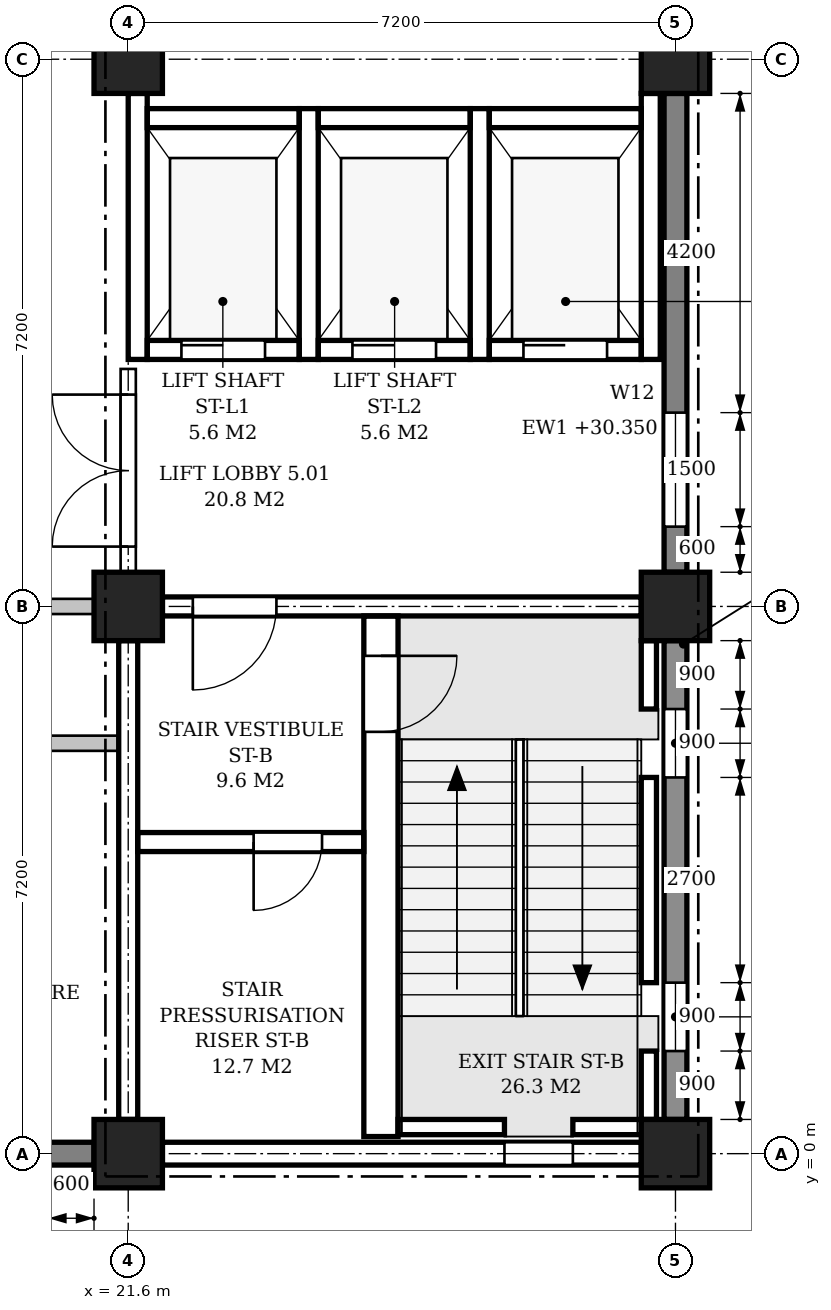
"""IFC4 building model, lengths in metres.
Left out: names, types, materials, properties, quantities, classifications, styles, units other than length and angle.
Written with IfcOpenShell. Run it as: python <this file> out.ifc"""

import sys

from ifc_helpers import new_model, si_unit, direction, frame, frame_2d, origin, origin_2d, place, context, subcontext, project, spatial, polyline, rectangle, outline, extrude, element, fill, save


model = new_model("IFC4")
c1 = context("Model", 3, precision=1e-05, world=origin(), true_north=direction((0.0, 1.0)))
c2 = subcontext(c1, "Body", "Model", "MODEL_VIEW")
j1 = project(units=[si_unit("LENGTHUNIT", "METRE"), si_unit("PLANEANGLEUNIT", "RADIAN")], contexts=[c1])
p1 = place(None, origin())
s1 = spatial("IfcSite", under=j1, at=p1, CompositionType="ELEMENT")
p2 = place(p1, origin())
s2 = spatial("IfcBuilding", under=s1, at=p2, CompositionType="ELEMENT")
p3 = place(p2, frame((0.0, 0.0, 26.4)))
s3 = spatial("IfcBuildingStorey", under=s2, at=p3, CompositionType="ELEMENT", Elevation=26.4)
for number, where, z_axis, x_axis in (
    (1, (21.6, 0.0, 0.0), (0.0, 0.0, 1.0), (1.0, 0.0, 0.0)),
    (2, (21.6, 7.2, 0.0), (0.0, 0.0, 1.0), (1.0, 0.0, 0.0)),
    (3, (21.6, 14.4, 0.0), (0.0, 0.0, 1.0), (1.0, 0.0, 0.0)),
    (4, (28.8, 0.0, 0.0), (0.0, 0.0, 1.0), (1.0, 0.0, 0.0)),
    (5, (28.8, 7.2, 0.0), (0.0, 0.0, 1.0), (1.0, 0.0, 0.0)),
    (6, (28.8, 14.4, 0.0), (0.0, 0.0, 1.0), (1.0, 0.0, 0.0)),
):
    element("IfcColumn", number, at=place(p3, frame(where, z_axis=z_axis, x_axis=x_axis)), inside=s3, PredefinedType="COLUMN", context=c2, shape_type="SweptSolid", body=[
        extrude(rectangle(XDim=0.9, YDim=0.9, at=origin_2d()), origin(), (0.0, 0.0, 1.0), 4.8),
    ])
p4 = place(p3, frame((14.85, 0.0, 0.0), z_axis=(0.0, 0.0, 1.0), x_axis=(1.0, 0.0, 0.0)))
e7 = element("IfcWall", 7, at=p4, inside=s3, PredefinedType="STANDARD", context=c2, shape_type="SweptSolid", body=[
    extrude(rectangle(XDim=6.3, YDim=0.3, at=frame_2d((3.15, 0.0))), origin(), (0.0, 0.0, 1.0), 3.95),
])
p5 = place(p4, frame((0.6, 0.0, 0.9)))
e8 = element("IfcOpeningElement", 8, at=p5, cuts=e7, PredefinedType="OPENING", context=c2, shape_type="SweptSolid", body=[
    extrude(outline(polyline([(0.0, 0.0), (1.5, 0.0), (1.5, 1.75), (0.75, 2.5), (0.0, 1.75), (0.0, 0.0)])), frame((0.0, 0.16, 0.0), z_axis=(0.0, -1.0, 0.0), x_axis=(1.0, 0.0, 0.0)), (0.0, 0.0, 1.0), 0.32),
])
p6 = place(p4, frame((4.2, 0.0, 0.9)))
e9 = element("IfcOpeningElement", 9, at=p6, cuts=e7, PredefinedType="OPENING", context=c2, shape_type="SweptSolid", body=[
    extrude(outline(polyline([(0.0, 0.0), (1.5, 0.0), (1.5, 1.75), (0.75, 2.5), (0.0, 1.75), (0.0, 0.0)])), frame((0.0, 0.16, 0.0), z_axis=(0.0, -1.0, 0.0), x_axis=(1.0, 0.0, 0.0)), (0.0, 0.0, 1.0), 0.32),
])
p7 = place(p3, frame((22.05, 0.0, 0.0), z_axis=(0.0, 0.0, 1.0), x_axis=(1.0, 0.0, 0.0)))
e10 = element("IfcWall", 10, at=p7, inside=s3, PredefinedType="STANDARD", context=c2, shape_type="SweptSolid", body=[
    extrude(rectangle(XDim=6.3, YDim=0.3, at=frame_2d((3.15, 0.0))), origin(), (0.0, 0.0, 1.0), 3.95),
])
p8 = place(p7, frame((4.5, 0.0, 0.9)))
e11 = element("IfcOpeningElement", 11, at=p8, cuts=e10, PredefinedType="OPENING", context=c2, shape_type="SweptSolid", body=[
    extrude(outline(polyline([(0.0, 0.0), (0.9, 0.0), (0.9, 2.05), (0.45, 2.5), (0.0, 2.05), (0.0, 0.0)])), frame((0.0, 0.16, 0.0), z_axis=(0.0, -1.0, 0.0), x_axis=(1.0, 0.0, 0.0)), (0.0, 0.0, 1.0), 0.32),
])
p9 = place(p3, frame((28.8, 0.45, 0.0), z_axis=(0.0, 0.0, 1.0), x_axis=(0.0, 1.0, 0.0)))
e12 = element("IfcWall", 12, at=p9, inside=s3, PredefinedType="STANDARD", context=c2, shape_type="SweptSolid", body=[
    extrude(rectangle(XDim=6.3, YDim=0.3, at=frame_2d((3.15, 0.0))), origin(), (0.0, 0.0, 1.0), 3.95),
])
p10 = place(p9, frame((0.9, 0.0, 0.9)))
e13 = element("IfcOpeningElement", 13, at=p10, cuts=e12, PredefinedType="OPENING", context=c2, shape_type="SweptSolid", body=[
    extrude(outline(polyline([(0.0, 0.0), (0.9, 0.0), (0.9, 2.05), (0.45, 2.5), (0.0, 2.05), (0.0, 0.0)])), frame((0.0, 0.16, 0.0), z_axis=(0.0, -1.0, 0.0), x_axis=(1.0, 0.0, 0.0)), (0.0, 0.0, 1.0), 0.32),
])
p11 = place(p9, frame((4.5, 0.0, 0.9)))
e14 = element("IfcOpeningElement", 14, at=p11, cuts=e12, PredefinedType="OPENING", context=c2, shape_type="SweptSolid", body=[
    extrude(outline(polyline([(0.0, 0.0), (0.9, 0.0), (0.9, 2.05), (0.45, 2.5), (0.0, 2.05), (0.0, 0.0)])), frame((0.0, 0.16, 0.0), z_axis=(0.0, -1.0, 0.0), x_axis=(1.0, 0.0, 0.0)), (0.0, 0.0, 1.0), 0.32),
])
p12 = place(p3, frame((28.8, 7.65, 0.0), z_axis=(0.0, 0.0, 1.0), x_axis=(0.0, 1.0, 0.0)))
e15 = element("IfcWall", 15, at=p12, inside=s3, PredefinedType="STANDARD", context=c2, shape_type="SweptSolid", body=[
    extrude(rectangle(XDim=6.3, YDim=0.3, at=frame_2d((3.15, 0.0))), origin(), (0.0, 0.0, 1.0), 3.95),
])
p13 = place(p12, frame((0.6, 0.0, 0.9)))
e16 = element("IfcOpeningElement", 16, at=p13, cuts=e15, PredefinedType="OPENING", context=c2, shape_type="SweptSolid", body=[
    extrude(outline(polyline([(0.0, 0.0), (1.5, 0.0), (1.5, 1.75), (0.75, 2.5), (0.0, 1.75), (0.0, 0.0)])), frame((0.0, 0.16, 0.0), z_axis=(0.0, -1.0, 0.0), x_axis=(1.0, 0.0, 0.0)), (0.0, 0.0, 1.0), 0.32),
])
p14 = place(p3, frame((22.05, 7.2, 0.0), z_axis=(0.0, 0.0, 1.0), x_axis=(1.0, 0.0, 0.0)))
e17 = element("IfcWall", 17, at=p14, inside=s3, PredefinedType="SHEAR", context=c2, shape_type="SweptSolid", body=[
    extrude(rectangle(XDim=6.3, YDim=0.25, at=frame_2d((3.15, 0.0))), origin(), (0.0, 0.0, 1.0), 3.8),
])
p15 = place(p14, frame((0.4, 0.0, 0.0)))
e18 = element("IfcOpeningElement", 18, at=p15, cuts=e17, PredefinedType="OPENING", context=c2, shape_type="SweptSolid", body=[
    extrude(rectangle(XDim=1.1, YDim=2.1, at=frame_2d((0.55, 1.05))), frame((0.0, 0.135, 0.0), z_axis=(0.0, -1.0, 0.0), x_axis=(1.0, 0.0, 0.0)), (0.0, 0.0, 1.0), 0.27),
])
p16 = place(p3, frame((21.6, 0.45, 0.0), z_axis=(0.0, 0.0, 1.0), x_axis=(0.0, 1.0, 0.0)))
e19 = element("IfcWall", 19, at=p16, inside=s3, PredefinedType="SHEAR", context=c2, shape_type="SweptSolid", body=[
    extrude(rectangle(XDim=6.3, YDim=0.25, at=frame_2d((3.15, 0.0))), origin(), (0.0, 0.0, 1.0), 3.8),
])
p17 = place(p3, frame((28.45, 0.45, -0.25), z_axis=(0.0, 0.0, 1.0), x_axis=(0.0, 1.0, 0.0)))
e20 = element("IfcWall", 20, at=p17, inside=s3, PredefinedType="SHEAR", context=c2, shape_type="SweptSolid", body=[
    extrude(rectangle(XDim=0.9, YDim=0.2, at=frame_2d((0.45, 0.0))), origin(), (0.0, 0.0, 1.0), 4.8),
])
p18 = place(p3, frame((28.45, 2.25, -0.25), z_axis=(0.0, 0.0, 1.0), x_axis=(0.0, 1.0, 0.0)))
e21 = element("IfcWall", 21, at=p18, inside=s3, PredefinedType="SHEAR", context=c2, shape_type="SweptSolid", body=[
    extrude(rectangle(XDim=2.7, YDim=0.2, at=frame_2d((1.35, 0.0))), origin(), (0.0, 0.0, 1.0), 4.8),
])
p19 = place(p3, frame((28.45, 5.85, -0.25), z_axis=(0.0, 0.0, 1.0), x_axis=(0.0, 1.0, 0.0)))
e22 = element("IfcWall", 22, at=p19, inside=s3, PredefinedType="SHEAR", context=c2, shape_type="SweptSolid", body=[
    extrude(rectangle(XDim=0.9, YDim=0.2, at=frame_2d((0.45, 0.0))), origin(), (0.0, 0.0, 1.0), 4.8),
])
p20 = place(p3, frame((25.15, 0.35, -0.25), z_axis=(0.0, 0.0, 1.0), x_axis=(1.0, 0.0, 0.0)))
e23 = element("IfcWall", 23, at=p20, inside=s3, PredefinedType="SHEAR", context=c2, shape_type="SweptSolid", body=[
    extrude(rectangle(XDim=1.4, YDim=0.2, at=frame_2d((0.7, 0.0))), origin(), (0.0, 0.0, 1.0), 4.8),
])
p21 = place(p3, frame((27.45, 0.35, -0.25), z_axis=(0.0, 0.0, 1.0), x_axis=(1.0, 0.0, 0.0)))
e24 = element("IfcWall", 24, at=p21, inside=s3, PredefinedType="SHEAR", context=c2, shape_type="SweptSolid", body=[
    extrude(rectangle(XDim=0.9, YDim=0.2, at=frame_2d((0.45, 0.0))), origin(), (0.0, 0.0, 1.0), 4.8),
])
p22 = place(p3, frame((24.925, 0.225, 0.0), z_axis=(0.0, 0.0, 1.0), x_axis=(0.0, 1.0, 0.0)))
e25 = element("IfcWall", 25, at=p22, inside=s3, PredefinedType="SHEAR", context=c2, shape_type="SweptSolid", body=[
    extrude(rectangle(XDim=6.85, YDim=0.45, at=frame_2d((3.425, 0.0))), origin(), (0.0, 0.0, 1.0), 4.55),
])
p23 = place(p22, frame((5.325, 0.0, 0.0)))
e26 = element("IfcOpeningElement", 26, at=p23, cuts=e25, PredefinedType="OPENING", context=c2, shape_type="SweptSolid", body=[
    extrude(rectangle(XDim=1.0, YDim=2.1, at=frame_2d((0.5, 1.05))), frame((0.0, 0.235, 0.0), z_axis=(0.0, -1.0, 0.0), x_axis=(1.0, 0.0, 0.0)), (0.0, 0.0, 1.0), 0.47),
])
p24 = place(p3, frame((21.725, 4.1, 0.0), z_axis=(0.0, 0.0, 1.0), x_axis=(1.0, 0.0, 0.0)))
e27 = element("IfcWall", 27, at=p24, inside=s3, PredefinedType="SHEAR", context=c2, shape_type="SweptSolid", body=[
    extrude(rectangle(XDim=2.975, YDim=0.25, at=frame_2d((1.487, 0.0))), origin(), (0.0, 0.0, 1.0), 4.55),
])
p25 = place(p24, frame((1.525, 0.0, 0.0)))
e28 = element("IfcOpeningElement", 28, at=p25, cuts=e27, PredefinedType="OPENING", context=c2, shape_type="SweptSolid", body=[
    extrude(rectangle(XDim=0.9, YDim=2.1, at=frame_2d((0.45, 1.05))), frame((0.0, 0.135, 0.0), z_axis=(0.0, -1.0, 0.0), x_axis=(1.0, 0.0, 0.0)), (0.0, 0.0, 1.0), 0.27),
])
p26 = place(p3, frame((21.725, 10.45, -0.25), z_axis=(0.0, 0.0, 1.0), x_axis=(0.0, 1.0, 0.0)))
e29 = element("IfcWall", 29, at=p26, inside=s3, PredefinedType="SHEAR", context=c2, shape_type="SweptSolid", body=[
    extrude(rectangle(XDim=3.5, YDim=0.25, at=frame_2d((1.75, 0.0))), origin(), (0.0, 0.0, 1.0), 4.05),
])
for number, where, z_axis, x_axis in (
    (30, (23.975, 10.45, -0.25), (0.0, 0.0, 1.0), (0.0, 1.0, 0.0)),
    (31, (26.225, 10.45, -0.25), (0.0, 0.0, 1.0), (0.0, 1.0, 0.0)),
):
    element("IfcWall", number, at=place(p3, frame(where, z_axis=z_axis, x_axis=x_axis)), inside=s3, PredefinedType="SHEAR", context=c2, shape_type="SweptSolid", body=[
        extrude(rectangle(XDim=3.3, YDim=0.25, at=frame_2d((1.65, 0.0))), origin(), (0.0, 0.0, 1.0), 4.8),
    ])
p27 = place(p3, frame((28.475, 10.45, -0.25), z_axis=(0.0, 0.0, 1.0), x_axis=(0.0, 1.0, 0.0)))
e32 = element("IfcWall", 32, at=p27, inside=s3, PredefinedType="SHEAR", context=c2, shape_type="SweptSolid", body=[
    extrude(rectangle(XDim=3.5, YDim=0.25, at=frame_2d((1.75, 0.0))), origin(), (0.0, 0.0, 1.0), 4.8),
])
p28 = place(p3, frame((21.85, 10.575, -0.25), z_axis=(0.0, 0.0, 1.0), x_axis=(1.0, 0.0, 0.0)))
e33 = element("IfcWall", 33, at=p28, inside=s3, PredefinedType="SHEAR", context=c2, shape_type="SweptSolid", body=[
    extrude(rectangle(XDim=2.0, YDim=0.25, at=frame_2d((1.0, 0.0))), origin(), (0.0, 0.0, 1.0), 4.8),
])
p29 = place(p28, frame((0.45, 0.0, 0.25)))
e34 = element("IfcOpeningElement", 34, at=p29, cuts=e33, PredefinedType="OPENING", context=c2, shape_type="SweptSolid", body=[
    extrude(rectangle(XDim=1.1, YDim=2.1, at=frame_2d((0.55, 1.05))), frame((0.0, 0.135, 0.0), z_axis=(0.0, -1.0, 0.0), x_axis=(1.0, 0.0, 0.0)), (0.0, 0.0, 1.0), 0.27),
])
p30 = place(p3, frame((21.85, 13.625, -0.25), z_axis=(0.0, 0.0, 1.0), x_axis=(1.0, 0.0, 0.0)))
e35 = element("IfcWall", 35, at=p30, inside=s3, PredefinedType="SHEAR", context=c2, shape_type="SweptSolid", body=[
    extrude(rectangle(XDim=2.0, YDim=0.25, at=frame_2d((1.0, 0.0))), origin(), (0.0, 0.0, 1.0), 4.8),
])
p31 = place(p3, frame((24.1, 10.575, -0.25), z_axis=(0.0, 0.0, 1.0), x_axis=(1.0, 0.0, 0.0)))
e36 = element("IfcWall", 36, at=p31, inside=s3, PredefinedType="SHEAR", context=c2, shape_type="SweptSolid", body=[
    extrude(rectangle(XDim=2.0, YDim=0.25, at=frame_2d((1.0, 0.0))), origin(), (0.0, 0.0, 1.0), 4.8),
])
p32 = place(p31, frame((0.45, 0.0, 0.25)))
e37 = element("IfcOpeningElement", 37, at=p32, cuts=e36, PredefinedType="OPENING", context=c2, shape_type="SweptSolid", body=[
    extrude(rectangle(XDim=1.1, YDim=2.1, at=frame_2d((0.55, 1.05))), frame((0.0, 0.135, 0.0), z_axis=(0.0, -1.0, 0.0), x_axis=(1.0, 0.0, 0.0)), (0.0, 0.0, 1.0), 0.27),
])
p33 = place(p3, frame((24.1, 13.625, -0.25), z_axis=(0.0, 0.0, 1.0), x_axis=(1.0, 0.0, 0.0)))
e38 = element("IfcWall", 38, at=p33, inside=s3, PredefinedType="SHEAR", context=c2, shape_type="SweptSolid", body=[
    extrude(rectangle(XDim=2.0, YDim=0.25, at=frame_2d((1.0, 0.0))), origin(), (0.0, 0.0, 1.0), 4.8),
])
p34 = place(p3, frame((26.35, 10.575, -0.25), z_axis=(0.0, 0.0, 1.0), x_axis=(1.0, 0.0, 0.0)))
e39 = element("IfcWall", 39, at=p34, inside=s3, PredefinedType="SHEAR", context=c2, shape_type="SweptSolid", body=[
    extrude(rectangle(XDim=2.0, YDim=0.25, at=frame_2d((1.0, 0.0))), origin(), (0.0, 0.0, 1.0), 4.8),
])
p35 = place(p34, frame((0.45, 0.0, 0.25)))
e40 = element("IfcOpeningElement", 40, at=p35, cuts=e39, PredefinedType="OPENING", context=c2, shape_type="SweptSolid", body=[
    extrude(rectangle(XDim=1.1, YDim=2.1, at=frame_2d((0.55, 1.05))), frame((0.0, 0.135, 0.0), z_axis=(0.0, -1.0, 0.0), x_axis=(1.0, 0.0, 0.0)), (0.0, 0.0, 1.0), 0.27),
])
p36 = place(p3, frame((26.35, 13.625, -0.25), z_axis=(0.0, 0.0, 1.0), x_axis=(1.0, 0.0, 0.0)))
e41 = element("IfcWall", 41, at=p36, inside=s3, PredefinedType="SHEAR", context=c2, shape_type="SweptSolid", body=[
    extrude(rectangle(XDim=2.0, YDim=0.25, at=frame_2d((1.0, 0.0))), origin(), (0.0, 0.0, 1.0), 4.8),
])
p37 = place(p3, frame((7.325, 5.4, 0.0), z_axis=(0.0, 0.0, 1.0), x_axis=(1.0, 0.0, 0.0)))
e42 = element("IfcWall", 42, at=p37, inside=s3, PredefinedType="PARTITIONING", context=c2, shape_type="SweptSolid", body=[
    extrude(outline(polyline([(0.0, 0.0), (14.15, 0.0), (14.15, 3.8), (14.025, 3.8), (14.025, 4.55), (7.325, 4.55), (7.325, 3.8), (6.825, 3.8), (6.825, 4.55), (0.125, 4.55), (0.125, 3.8), (0.0, 3.8), (0.0, 0.0)])), frame((0.0, 0.1, 0.0), z_axis=(0.0, -1.0, 0.0), x_axis=(1.0, 0.0, 0.0)), (0.0, 0.0, 1.0), 0.2),
])
p38 = place(p37, frame((1.238, 0.0, 0.0)))
e43 = element("IfcOpeningElement", 43, at=p38, cuts=e42, PredefinedType="OPENING", context=c2, shape_type="SweptSolid", body=[
    extrude(rectangle(XDim=1.0, YDim=2.1, at=frame_2d((0.5, 1.05))), frame((0.0, 0.11, 0.0), z_axis=(0.0, -1.0, 0.0), x_axis=(1.0, 0.0, 0.0)), (0.0, 0.0, 1.0), 0.22),
])
p39 = place(p37, frame((4.775, 0.0, 0.0)))
e44 = element("IfcOpeningElement", 44, at=p39, cuts=e42, PredefinedType="OPENING", context=c2, shape_type="SweptSolid", body=[
    extrude(rectangle(XDim=1.0, YDim=2.1, at=frame_2d((0.5, 1.05))), frame((0.0, 0.11, 0.0), z_axis=(0.0, -1.0, 0.0), x_axis=(1.0, 0.0, 0.0)), (0.0, 0.0, 1.0), 0.22),
])
p40 = place(p37, frame((8.375, 0.0, 0.0)))
e45 = element("IfcOpeningElement", 45, at=p40, cuts=e42, PredefinedType="OPENING", context=c2, shape_type="SweptSolid", body=[
    extrude(rectangle(XDim=1.0, YDim=2.1, at=frame_2d((0.5, 1.05))), frame((0.0, 0.11, 0.0), z_axis=(0.0, -1.0, 0.0), x_axis=(1.0, 0.0, 0.0)), (0.0, 0.0, 1.0), 0.22),
])
p41 = place(p37, frame((11.913, 0.0, 0.0)))
e46 = element("IfcOpeningElement", 46, at=p41, cuts=e42, PredefinedType="OPENING", context=c2, shape_type="SweptSolid", body=[
    extrude(rectangle(XDim=1.0, YDim=2.1, at=frame_2d((0.5, 1.05))), frame((0.0, 0.11, 0.0), z_axis=(0.0, -1.0, 0.0), x_axis=(1.0, 0.0, 0.0)), (0.0, 0.0, 1.0), 0.22),
])
p42 = place(p3, frame((14.85, 7.2, 0.0), z_axis=(0.0, 0.0, 1.0), x_axis=(1.0, 0.0, 0.0)))
e47 = element("IfcWall", 47, at=p42, inside=s3, PredefinedType="PARTITIONING", context=c2, shape_type="SweptSolid", body=[
    extrude(rectangle(XDim=6.3, YDim=0.2, at=frame_2d((3.15, 0.0))), origin(), (0.0, 0.0, 1.0), 3.8),
])
p43 = place(p42, frame((4.225, 0.0, 0.0)))
e48 = element("IfcOpeningElement", 48, at=p43, cuts=e47, PredefinedType="OPENING", context=c2, shape_type="SweptSolid", body=[
    extrude(rectangle(XDim=1.0, YDim=2.1, at=frame_2d((0.5, 1.05))), frame((0.0, 0.11, 0.0), z_axis=(0.0, -1.0, 0.0), x_axis=(1.0, 0.0, 0.0)), (0.0, 0.0, 1.0), 0.22),
])
p44 = place(p3, frame((21.6, 7.65, 0.0), z_axis=(0.0, 0.0, 1.0), x_axis=(0.0, 1.0, 0.0)))
e49 = element("IfcWall", 49, at=p44, inside=s3, PredefinedType="PARTITIONING", context=c2, shape_type="SweptSolid", body=[
    extrude(rectangle(XDim=2.675, YDim=0.2, at=frame_2d((1.337, 0.0))), origin(), (0.0, 0.0, 1.0), 3.8),
])
p45 = place(p44, frame((0.337, 0.0, 0.0)))
e50 = element("IfcOpeningElement", 50, at=p45, cuts=e49, PredefinedType="OPENING", context=c2, shape_type="SweptSolid", body=[
    extrude(rectangle(XDim=2.0, YDim=2.4, at=frame_2d((1.0, 1.2))), frame((0.0, 0.11, 0.0), z_axis=(0.0, -1.0, 0.0), x_axis=(1.0, 0.0, 0.0)), (0.0, 0.0, 1.0), 0.22),
])
p46 = place(p10, origin())
e51 = element("IfcWindow", 51, at=p46, inside=s3, PartitioningType="SINGLE_PANEL", PredefinedType="WINDOW", context=c2, shape_type="SweptSolid", body=[
    extrude(outline(polyline([(0.0, 0.0), (0.9, 0.0), (0.9, 2.05), (0.45, 2.5), (0.0, 2.05), (0.0, 0.0)])), frame((0.0, 0.03, 0.0), z_axis=(0.0, -1.0, 0.0), x_axis=(1.0, 0.0, 0.0)), (0.0, 0.0, 1.0), 0.06),
])
fill(e13, e51)
p47 = place(p11, origin())
e52 = element("IfcWindow", 52, at=p47, inside=s3, PartitioningType="SINGLE_PANEL", PredefinedType="WINDOW", context=c2, shape_type="SweptSolid", body=[
    extrude(outline(polyline([(0.0, 0.0), (0.9, 0.0), (0.9, 2.05), (0.45, 2.5), (0.0, 2.05), (0.0, 0.0)])), frame((0.0, 0.03, 0.0), z_axis=(0.0, -1.0, 0.0), x_axis=(1.0, 0.0, 0.0)), (0.0, 0.0, 1.0), 0.06),
])
fill(e14, e52)
p48 = place(p13, origin())
e53 = element("IfcWindow", 53, at=p48, inside=s3, PartitioningType="SINGLE_PANEL", PredefinedType="WINDOW", context=c2, shape_type="SweptSolid", body=[
    extrude(outline(polyline([(0.0, 0.0), (1.5, 0.0), (1.5, 1.75), (0.75, 2.5), (0.0, 1.75), (0.0, 0.0)])), frame((0.0, 0.03, 0.0), z_axis=(0.0, -1.0, 0.0), x_axis=(1.0, 0.0, 0.0)), (0.0, 0.0, 1.0), 0.06),
])
fill(e16, e53)
p49 = place(p8, origin())
e54 = element("IfcWindow", 54, at=p49, inside=s3, PartitioningType="SINGLE_PANEL", PredefinedType="WINDOW", context=c2, shape_type="SweptSolid", body=[
    extrude(outline(polyline([(0.0, 0.0), (0.9, 0.0), (0.9, 2.05), (0.45, 2.5), (0.0, 2.05), (0.0, 0.0)])), frame((0.0, 0.03, 0.0), z_axis=(0.0, -1.0, 0.0), x_axis=(1.0, 0.0, 0.0)), (0.0, 0.0, 1.0), 0.06),
])
fill(e11, e54)
p50 = place(p23, frame((1.0, 0.0, 0.0), z_axis=(0.0, 0.0, 1.0), x_axis=(-1.0, 0.0, 0.0)))
e55 = element("IfcDoor", 55, at=p50, inside=s3, OperationType="SINGLE_SWING_LEFT", PredefinedType="DOOR", context=c2, shape_type="SweptSolid", body=[
    extrude(rectangle(XDim=1.0, YDim=2.1, at=frame_2d((0.5, 1.05))), frame((0.0, 0.025, 0.0), z_axis=(0.0, -1.0, 0.0), x_axis=(1.0, 0.0, 0.0)), (0.0, 0.0, 1.0), 0.05),
])
fill(e26, e55)
p51 = place(p15, frame((1.1, 0.0, 0.0), z_axis=(0.0, 0.0, 1.0), x_axis=(-1.0, 0.0, 0.0)))
e56 = element("IfcDoor", 56, at=p51, inside=s3, OperationType="SINGLE_SWING_RIGHT", PredefinedType="DOOR", context=c2, shape_type="SweptSolid", body=[
    extrude(rectangle(XDim=1.1, YDim=2.1, at=frame_2d((0.55, 1.05))), frame((0.0, 0.025, 0.0), z_axis=(0.0, -1.0, 0.0), x_axis=(1.0, 0.0, 0.0)), (0.0, 0.0, 1.0), 0.05),
])
fill(e18, e56)
p52 = place(p25, frame((0.9, 0.0, 0.0), z_axis=(0.0, 0.0, 1.0), x_axis=(-1.0, 0.0, 0.0)))
e57 = element("IfcDoor", 57, at=p52, inside=s3, OperationType="SINGLE_SWING_RIGHT", PredefinedType="DOOR", context=c2, shape_type="SweptSolid", body=[
    extrude(rectangle(XDim=0.9, YDim=2.1, at=frame_2d((0.45, 1.05))), frame((0.0, 0.025, 0.0), z_axis=(0.0, -1.0, 0.0), x_axis=(1.0, 0.0, 0.0)), (0.0, 0.0, 1.0), 0.05),
])
fill(e28, e57)
p53 = place(p29, origin())
e58 = element("IfcDoor", 58, at=p53, inside=s3, OperationType="SLIDING_TO_LEFT", PredefinedType="DOOR", context=c2, shape_type="SweptSolid", body=[
    extrude(rectangle(XDim=1.1, YDim=2.1, at=frame_2d((0.55, 1.05))), frame((0.0, 0.025, 0.0), z_axis=(0.0, -1.0, 0.0), x_axis=(1.0, 0.0, 0.0)), (0.0, 0.0, 1.0), 0.05),
])
fill(e34, e58)
p54 = place(p32, origin())
e59 = element("IfcDoor", 59, at=p54, inside=s3, OperationType="SLIDING_TO_LEFT", PredefinedType="DOOR", context=c2, shape_type="SweptSolid", body=[
    extrude(rectangle(XDim=1.1, YDim=2.1, at=frame_2d((0.55, 1.05))), frame((0.0, 0.025, 0.0), z_axis=(0.0, -1.0, 0.0), x_axis=(1.0, 0.0, 0.0)), (0.0, 0.0, 1.0), 0.05),
])
fill(e37, e59)
p55 = place(p35, origin())
e60 = element("IfcDoor", 60, at=p55, inside=s3, OperationType="SLIDING_TO_LEFT", PredefinedType="DOOR", context=c2, shape_type="SweptSolid", body=[
    extrude(rectangle(XDim=1.1, YDim=2.1, at=frame_2d((0.55, 1.05))), frame((0.0, 0.025, 0.0), z_axis=(0.0, -1.0, 0.0), x_axis=(1.0, 0.0, 0.0)), (0.0, 0.0, 1.0), 0.05),
])
fill(e40, e60)
p56 = place(p45, origin())
e61 = element("IfcDoor", 61, at=p56, inside=s3, OperationType="DOUBLE_DOOR_SINGLE_SWING", PredefinedType="DOOR", context=c2, shape_type="SweptSolid", body=[
    extrude(rectangle(XDim=2.0, YDim=2.4, at=frame_2d((1.0, 1.2))), frame((0.0, 0.025, 0.0), z_axis=(0.0, -1.0, 0.0), x_axis=(1.0, 0.0, 0.0)), (0.0, 0.0, 1.0), 0.05),
])
fill(e50, e61)
save(model, sys.argv[1])
